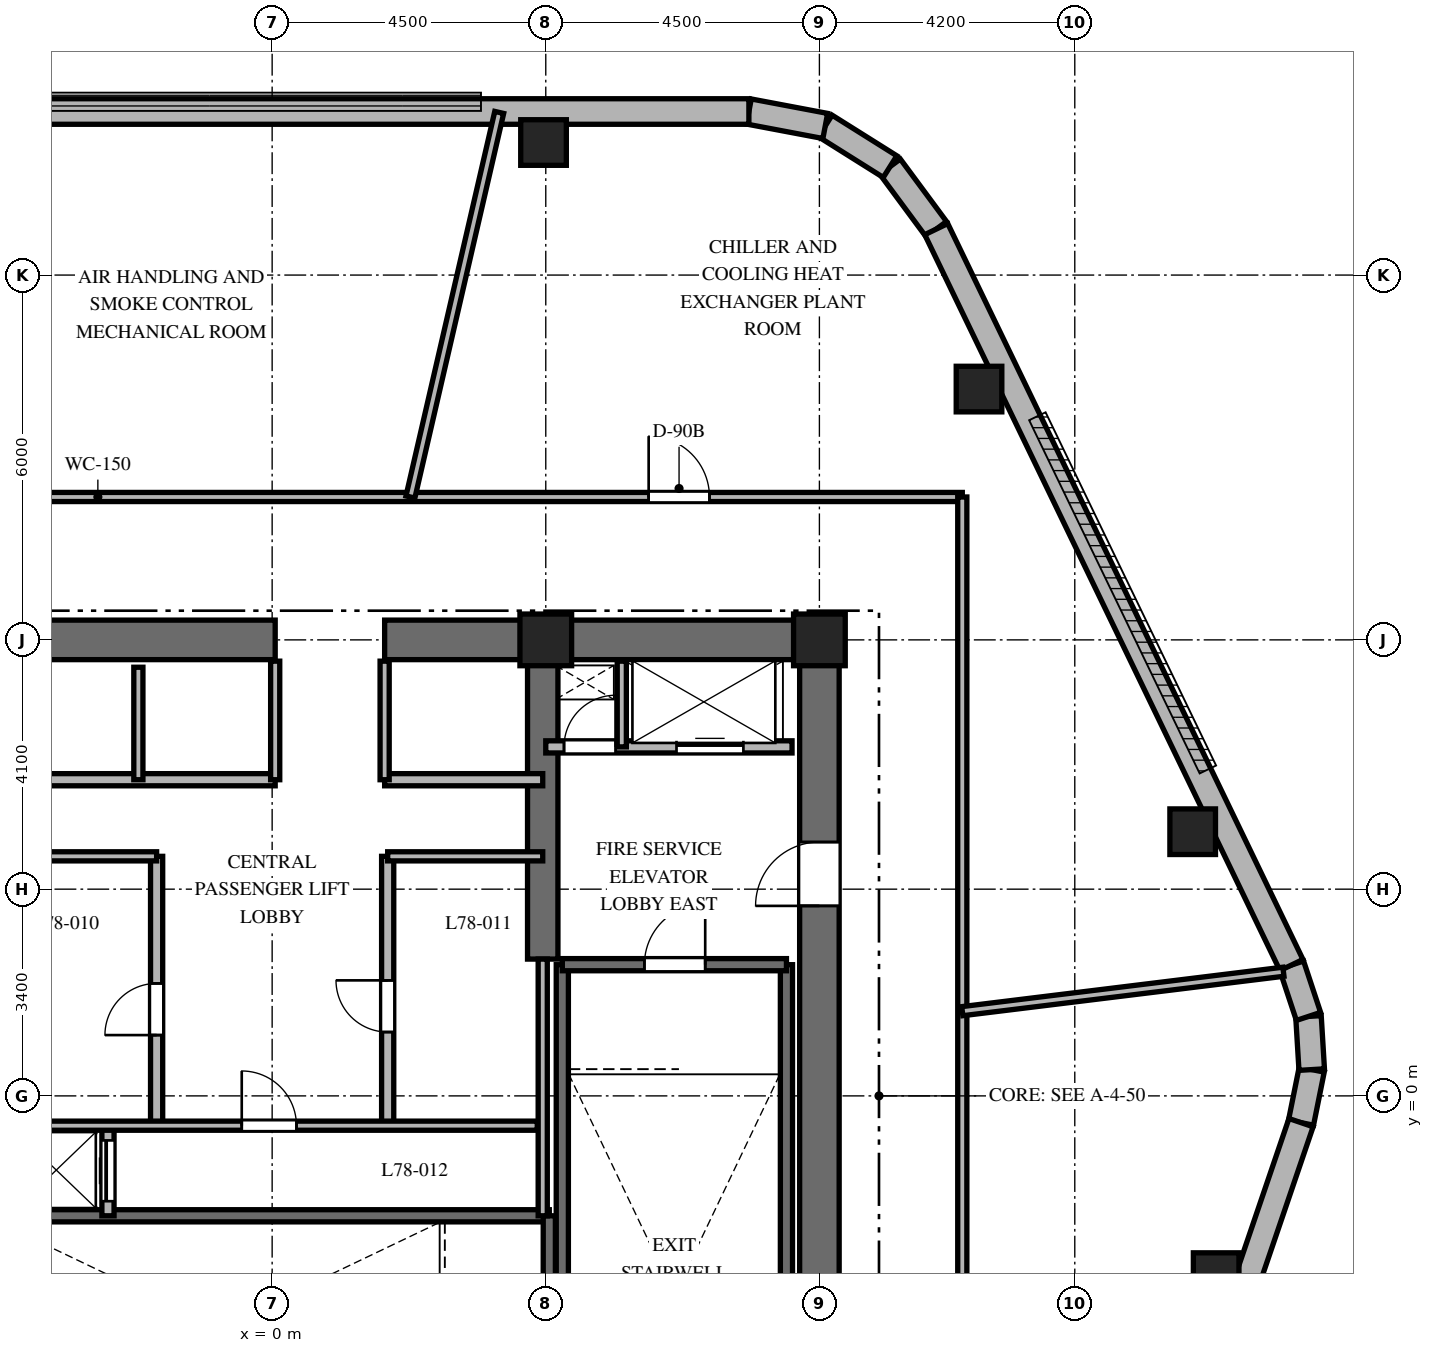
"""IFC4 building model, lengths in metres.
Left out: names, types, materials, properties, quantities, classifications, styles, units other than length and angle.
Written with IfcOpenShell. Run it as: python <this file> out.ifc"""

import sys

from ifc_helpers import new_model, si_unit, direction, frame, frame_2d, origin, origin_2d, place, context, subcontext, project, spatial, rectangle, extrude, element, fill, save


model = new_model("IFC4")
c1 = context("Model", 3, precision=1e-05, world=origin(), true_north=direction((0.0, 1.0)))
c2 = subcontext(c1, "Body", "Model", "MODEL_VIEW")
j1 = project(units=[si_unit("LENGTHUNIT", "METRE"), si_unit("PLANEANGLEUNIT", "RADIAN")], contexts=[c1])
p1 = place(None, origin())
s1 = spatial("IfcSite", under=j1, at=p1, CompositionType="ELEMENT")
p2 = place(p1, origin())
s2 = spatial("IfcBuilding", under=s1, at=p2, CompositionType="ELEMENT")
p3 = place(p2, frame((0.0, 0.0, 315.9)))
s3 = spatial("IfcBuildingStorey", under=s2, at=p3, CompositionType="ELEMENT", Elevation=315.9)
p4 = place(p3, frame((-9.325, 7.5, 0.0), z_axis=(0.0, 0.0, 1.0), x_axis=(1.0, 0.0, 0.0)))
e1 = element("IfcWall", 1, at=p4, inside=s3, PredefinedType="SHEAR", context=c2, shape_type="SweptSolid", body=[
    extrude(rectangle(XDim=9.375, YDim=0.65, at=frame_2d((4.688, 0.0))), origin(), (0.0, 0.0, 1.0), 5.5),
])
p5 = place(p3, frame((1.85, 7.5, 0.0), z_axis=(0.0, 0.0, 1.0), x_axis=(1.0, 0.0, 0.0)))
e2 = element("IfcWall", 2, at=p5, inside=s3, PredefinedType="SHEAR", context=c2, shape_type="SweptSolid", body=[
    extrude(rectangle(XDim=7.475, YDim=0.65, at=frame_2d((3.737, 0.0))), origin(), (0.0, 0.0, 1.0), 5.5),
])
p6 = place(p3, frame((9.0, -7.175, 0.0), z_axis=(0.0, 0.0, 1.0), x_axis=(0.0, 1.0, 0.0)))
e3 = element("IfcWall", 3, at=p6, inside=s3, PredefinedType="SHEAR", context=c2, shape_type="SweptSolid", body=[
    extrude(rectangle(XDim=14.35, YDim=0.65, at=frame_2d((7.175, 0.0))), origin(), (0.0, 0.0, 1.0), 5.5),
])
p7 = place(p6, frame((10.3, 0.0, 0.0)))
e4 = element("IfcOpeningElement", 4, at=p7, cuts=e3, PredefinedType="OPENING", context=c2, shape_type="SweptSolid", body=[
    extrude(rectangle(XDim=1.05, YDim=2.15, at=frame_2d((0.525, 1.075))), frame((0.0, 0.335, 0.0), z_axis=(0.0, -1.0, 0.0), x_axis=(1.0, 0.0, 0.0)), (0.0, 0.0, 1.0), 0.67),
])
p8 = place(p3, frame((4.45, 2.25, 0.0), z_axis=(0.0, 0.0, 1.0), x_axis=(0.0, 1.0, 0.0)))
e5 = element("IfcWall", 5, at=p8, inside=s3, PredefinedType="SHEAR", context=c2, shape_type="SweptSolid", body=[
    extrude(rectangle(XDim=4.925, YDim=0.5, at=frame_2d((2.462, 0.0))), origin(), (0.0, 0.0, 1.0), 5.5),
])
for number, where, z_axis, x_axis in (
    (6, (4.772, -6.985, 0.0), (0.0, 0.0, 1.0), (0.0, 1.0, 0.0)),
    (7, (8.458, -6.985, 0.0), (0.0, 0.0, 1.0), (0.0, 1.0, 0.0)),
):
    element("IfcWall", number, at=place(p3, frame(where, z_axis=z_axis, x_axis=x_axis)), inside=s3, PredefinedType="SHEAR", context=c2, shape_type="SweptSolid", body=[
        extrude(rectangle(XDim=9.143, YDim=0.2, at=frame_2d((4.572, 0.0))), origin(), (0.0, 0.0, 1.0), 5.5),
    ])
p9 = place(p3, frame((4.772, 2.158, 0.0), z_axis=(0.0, 0.0, 1.0), x_axis=(1.0, 0.0, 0.0)))
e8 = element("IfcWall", 8, at=p9, inside=s3, PredefinedType="SHEAR", context=c2, shape_type="SweptSolid", body=[
    extrude(rectangle(XDim=3.686, YDim=0.2, at=frame_2d((1.843, 0.0))), origin(), (0.0, 0.0, 1.0), 5.5),
])
p10 = place(p9, frame((1.35, 0.0, 0.0)))
e9 = element("IfcOpeningElement", 9, at=p10, cuts=e8, PredefinedType="OPENING", context=c2, shape_type="SweptSolid", body=[
    extrude(rectangle(XDim=1.0, YDim=2.15, at=frame_2d((0.5, 1.075))), frame((0.0, 0.11, 0.0), z_axis=(0.0, -1.0, 0.0), x_axis=(1.0, 0.0, 0.0)), (0.0, 0.0, 1.0), 0.22),
])
p11 = place(p3, frame((-4.608, -1.972, 0.0), z_axis=(0.0, 0.0, 1.0), x_axis=(1.0, 0.0, 0.0)))
e10 = element("IfcWall", 10, at=p11, inside=s3, PredefinedType="SHEAR", context=c2, shape_type="SweptSolid", body=[
    extrude(rectangle(XDim=9.166, YDim=0.2, at=frame_2d((4.583, 0.0))), origin(), (0.0, 0.0, 1.0), 5.5),
])
p12 = place(p3, frame((4.558, -5.658, 0.0), z_axis=(0.0, 0.0, 1.0), x_axis=(0.0, 1.0, 0.0)))
e11 = element("IfcWall", 11, at=p12, inside=s3, PredefinedType="SHEAR", context=c2, shape_type="SweptSolid", body=[
    extrude(rectangle(XDim=3.686, YDim=0.2, at=frame_2d((1.843, 0.0))), origin(), (0.0, 0.0, 1.0), 5.5),
])
for number, where, z_axis, x_axis in (
    (12, (9.0, 7.5, 0.0), (0.0, 0.0, 1.0), (1.0, 0.0, 0.0)),
    (13, (4.5, 7.5, 0.0), (0.0, 0.0, 1.0), (1.0, 0.0, 0.0)),
):
    element("IfcColumn", number, at=place(p3, frame(where, z_axis=z_axis, x_axis=x_axis)), inside=s3, PredefinedType="COLUMN", context=c2, shape_type="SweptSolid", body=[
        extrude(rectangle(XDim=0.85, YDim=0.85, at=origin_2d()), origin(), (0.0, 0.0, 1.0), 5.5),
    ])
for number, where, z_axis, x_axis in (
    (14, (15.525, -2.956, 0.0), (0.0, 0.0, 1.0), (1.0, 0.0, 0.0)),
    (15, (15.139, 4.345, 0.0), (0.0, 0.0, 1.0), (1.0, 0.0, 0.0)),
    (16, (11.625, 11.625, 0.0), (0.0, 0.0, 1.0), (1.0, 0.0, 0.0)),
    (17, (4.463, 15.68, 0.0), (0.0, 0.0, 1.0), (1.0, 0.0, 0.0)),
):
    element("IfcColumn", number, at=place(p3, frame(where, z_axis=z_axis, x_axis=x_axis)), inside=s3, PredefinedType="COLUMN", context=c2, shape_type="SweptSolid", body=[
        extrude(rectangle(XDim=0.75, YDim=0.75, at=origin_2d()), origin(), (0.0, 0.0, 1.0), 5.5),
    ])
p13 = place(p3, frame((16.921, -0.44, 0.0), z_axis=(0.0, 0.0, 1.0), x_axis=(0.197170749138, 0.980369162961, 0.0)))
e18 = element("IfcWall", 18, at=p13, inside=s3, PredefinedType="SOLIDWALL", context=c2, shape_type="SweptSolid", body=[
    extrude(rectangle(XDim=0.89, YDim=0.42, at=frame_2d((0.445, 0.0))), origin(), (0.0, 0.0, 1.0), 5.18),
])
p14 = place(p3, frame((17.096, 0.433, 0.0), z_axis=(0.0, 0.0, 1.0), x_axis=(-0.060469820114, 0.998170026025, 0.0)))
e19 = element("IfcWall", 19, at=p14, inside=s3, PredefinedType="SOLIDWALL", context=c2, shape_type="SweptSolid", body=[
    extrude(rectangle(XDim=0.876, YDim=0.42, at=frame_2d((0.438, 0.0))), origin(), (0.0, 0.0, 1.0), 5.18),
])
p15 = place(p3, frame((17.043, 1.307, 0.0), z_axis=(0.0, 0.0, 1.0), x_axis=(-0.314581701602, 0.949230400386, 0.0)))
e20 = element("IfcWall", 20, at=p15, inside=s3, PredefinedType="SOLIDWALL", context=c2, shape_type="SweptSolid", body=[
    extrude(rectangle(XDim=0.89, YDim=0.42, at=frame_2d((0.445, 0.0))), origin(), (0.0, 0.0, 1.0), 5.18),
])
p16 = place(p3, frame((10.922, 14.256, 0.0), z_axis=(0.0, 0.0, 1.0), x_axis=(-0.594423284796, 0.804152322941, 0.0)))
e21 = element("IfcWall", 21, at=p16, inside=s3, PredefinedType="SOLIDWALL", context=c2, shape_type="SweptSolid", body=[
    extrude(rectangle(XDim=1.278, YDim=0.42, at=frame_2d((0.639, 0.0))), origin(), (0.0, 0.0, 1.0), 5.18),
])
p17 = place(p3, frame((10.162, 15.284, 0.0), z_axis=(0.0, 0.0, 1.0), x_axis=(-0.846993641169, 0.53160302089, 0.0)))
e22 = element("IfcWall", 22, at=p17, inside=s3, PredefinedType="SOLIDWALL", context=c2, shape_type="SweptSolid", body=[
    extrude(rectangle(XDim=1.258, YDim=0.42, at=frame_2d((0.629, 0.0))), origin(), (0.0, 0.0, 1.0), 5.18),
])
p18 = place(p3, frame((9.096, 15.952, 0.0), z_axis=(0.0, 0.0, 1.0), x_axis=(-0.982583442004, 0.185821902637, 0.0)))
e23 = element("IfcWall", 23, at=p18, inside=s3, PredefinedType="SOLIDWALL", context=c2, shape_type="SweptSolid", body=[
    extrude(rectangle(XDim=1.278, YDim=0.42, at=frame_2d((0.639, 0.0))), origin(), (0.0, 0.0, 1.0), 5.18),
])
p19 = place(p3, frame((12.344, -13.873, 0.0), z_axis=(0.0, 0.0, 1.0), x_axis=(0.322553427155, 0.946551259378, 0.0)))
e24 = element("IfcWall", 24, at=p19, inside=s3, PredefinedType="SOLIDWALL", context=c2, shape_type="SweptSolid", body=[
    extrude(rectangle(XDim=14.191, YDim=0.42, at=frame_2d((7.096, 0.0))), origin(), (0.0, 0.0, 1.0), 5.18),
])
p20 = place(p3, frame((16.763, 2.152, 0.0), z_axis=(0.0, 0.0, 1.0), x_axis=(-0.434664735238, 0.900592342817, 0.0)))
e25 = element("IfcWall", 25, at=p20, inside=s3, PredefinedType="SOLIDWALL", context=c2, shape_type="SweptSolid", body=[
    extrude(rectangle(XDim=13.44, YDim=0.42, at=frame_2d((6.72, 0.0))), origin(), (0.0, 0.0, 1.0), 5.18),
])
p21 = place(p3, frame((7.84, 16.19, 0.0), z_axis=(0.0, 0.0, 1.0), x_axis=(-1.0, 0.0, 0.0)))
e26 = element("IfcWall", 26, at=p21, inside=s3, PredefinedType="SOLIDWALL", context=c2, shape_type="SweptSolid", body=[
    extrude(rectangle(XDim=16.946, YDim=0.42, at=frame_2d((8.473, 0.0))), origin(), (0.0, 0.0, 1.0), 5.18),
])
p22 = place(p3, frame((4.5, 5.74, 0.0), z_axis=(0.0, 0.0, 1.0), x_axis=(1.0, 0.0, 0.0)))
e27 = element("IfcWall", 27, at=p22, inside=s3, PredefinedType="PARTITIONING", context=c2, shape_type="SweptSolid", body=[
    extrude(rectangle(XDim=4.05, YDim=0.2, at=frame_2d((2.025, 0.0))), origin(), (0.0, 0.0, 1.0), 5.18),
])
p23 = place(p22, frame((0.3, 0.0, 0.0)))
e28 = element("IfcOpeningElement", 28, at=p23, cuts=e27, PredefinedType="OPENING", context=c2, shape_type="SweptSolid", body=[
    extrude(rectangle(XDim=0.85, YDim=2.03, at=frame_2d((0.425, 1.015))), frame((0.0, 0.11, 0.0), z_axis=(0.0, -1.0, 0.0), x_axis=(1.0, 0.0, 0.0)), (0.0, 0.0, 1.0), 0.22),
])
p24 = place(p22, frame((2.15, 0.0, 0.0)))
e29 = element("IfcOpeningElement", 29, at=p24, cuts=e27, PredefinedType="OPENING", context=c2, shape_type="SweptSolid", body=[
    extrude(rectangle(XDim=1.1, YDim=2.2, at=frame_2d((0.55, 1.1))), frame((0.0, 0.11, 0.0), z_axis=(0.0, -1.0, 0.0), x_axis=(1.0, 0.0, 0.0)), (0.0, 0.0, 1.0), 0.22),
])
p25 = place(p3, frame((5.75, 5.74, 0.0), z_axis=(0.0, 0.0, 1.0), x_axis=(0.0, 1.0, 0.0)))
e30 = element("IfcWall", 30, at=p25, inside=s3, PredefinedType="PARTITIONING", context=c2, shape_type="SweptSolid", body=[
    extrude(rectangle(XDim=1.41, YDim=0.15, at=frame_2d((0.705, 0.0))), origin(), (0.0, 0.0, 1.0), 5.18),
])
p26 = place(p3, frame((-2.7, -1.972, 0.0), z_axis=(0.0, 0.0, 1.0), x_axis=(0.0, 1.0, 0.0)))
e31 = element("IfcWall", 31, at=p26, inside=s3, PredefinedType="PARTITIONING", context=c2, shape_type="SweptSolid", body=[
    extrude(rectangle(XDim=1.472, YDim=0.2, at=frame_2d((0.736, 0.0))), origin(), (0.0, 0.0, 1.0), 5.18),
])
p27 = place(p26, frame((0.24, 0.0, 0.0)))
e32 = element("IfcOpeningElement", 32, at=p27, cuts=e31, PredefinedType="OPENING", context=c2, shape_type="SweptSolid", body=[
    extrude(rectangle(XDim=1.0, YDim=2.2, at=frame_2d((0.5, 1.1))), frame((0.0, 0.11, 0.0), z_axis=(0.0, -1.0, 0.0), x_axis=(1.0, 0.0, 0.0)), (0.0, 0.0, 1.0), 0.22),
])
p28 = place(p3, frame((-4.45, 5.2, 0.0), z_axis=(0.0, 0.0, 1.0), x_axis=(1.0, 0.0, 0.0)))
e33 = element("IfcWall", 33, at=p28, inside=s3, PredefinedType="PARTITIONING", context=c2, shape_type="SweptSolid", body=[
    extrude(rectangle(XDim=4.5, YDim=0.2, at=frame_2d((2.25, 0.0))), origin(), (0.0, 0.0, 1.0), 5.18),
])
p29 = place(p3, frame((1.85, 5.2, 0.0), z_axis=(0.0, 0.0, 1.0), x_axis=(1.0, 0.0, 0.0)))
e34 = element("IfcWall", 34, at=p29, inside=s3, PredefinedType="PARTITIONING", context=c2, shape_type="SweptSolid", body=[
    extrude(rectangle(XDim=2.6, YDim=0.2, at=frame_2d((1.3, 0.0))), origin(), (0.0, 0.0, 1.0), 5.18),
])
p30 = place(p3, frame((-2.2, 5.2, 0.0), z_axis=(0.0, 0.0, 1.0), x_axis=(0.0, 1.0, 0.0)))
e35 = element("IfcWall", 35, at=p30, inside=s3, PredefinedType="PARTITIONING", context=c2, shape_type="SweptSolid", body=[
    extrude(rectangle(XDim=1.85, YDim=0.15, at=frame_2d((0.925, 0.0))), origin(), (0.0, 0.0, 1.0), 5.18),
])
for number, where, z_axis, x_axis in (
    (36, (0.05, 5.2, 0.0), (0.0, 0.0, 1.0), (0.0, 1.0, 0.0)),
    (37, (1.85, 5.2, 0.0), (0.0, 0.0, 1.0), (0.0, 1.0, 0.0)),
):
    element("IfcWall", number, at=place(p3, frame(where, z_axis=z_axis, x_axis=x_axis)), inside=s3, PredefinedType="PARTITIONING", context=c2, shape_type="SweptSolid", body=[
        extrude(rectangle(XDim=1.95, YDim=0.15, at=frame_2d((0.975, 0.0))), origin(), (0.0, 0.0, 1.0), 5.18),
    ])
p31 = place(p3, frame((4.45, -1.972, 0.0), z_axis=(0.0, 0.0, 1.0), x_axis=(0.0, 1.0, 0.0)))
e38 = element("IfcWall", 38, at=p31, inside=s3, PredefinedType="PARTITIONING", context=c2, shape_type="SweptSolid", body=[
    extrude(rectangle(XDim=4.222, YDim=0.15, at=frame_2d((2.111, 0.0))), origin(), (0.0, 0.0, 1.0), 5.18),
])
p32 = place(p3, frame((-1.9, -0.5, 0.0), z_axis=(0.0, 0.0, 1.0), x_axis=(0.0, 1.0, 0.0)))
e39 = element("IfcWall", 39, at=p32, inside=s3, PredefinedType="PARTITIONING", context=c2, shape_type="SweptSolid", body=[
    extrude(rectangle(XDim=4.44, YDim=0.2, at=frame_2d((2.22, 0.0))), origin(), (0.0, 0.0, 1.0), 5.18),
])
p33 = place(p32, frame((1.5, 0.0, 0.0)))
e40 = element("IfcOpeningElement", 40, at=p33, cuts=e39, PredefinedType="OPENING", context=c2, shape_type="SweptSolid", body=[
    extrude(rectangle(XDim=0.85, YDim=2.03, at=frame_2d((0.425, 1.015))), frame((0.0, 0.11, 0.0), z_axis=(0.0, -1.0, 0.0), x_axis=(1.0, 0.0, 0.0)), (0.0, 0.0, 1.0), 0.22),
])
p34 = place(p3, frame((-4.45, 3.94, 0.0), z_axis=(0.0, 0.0, 1.0), x_axis=(1.0, 0.0, 0.0)))
e41 = element("IfcWall", 41, at=p34, inside=s3, PredefinedType="PARTITIONING", context=c2, shape_type="SweptSolid", body=[
    extrude(rectangle(XDim=2.55, YDim=0.15, at=frame_2d((1.275, 0.0))), origin(), (0.0, 0.0, 1.0), 5.18),
])
p35 = place(p3, frame((1.9, -0.5, 0.0), z_axis=(0.0, 0.0, 1.0), x_axis=(0.0, 1.0, 0.0)))
e42 = element("IfcWall", 42, at=p35, inside=s3, PredefinedType="PARTITIONING", context=c2, shape_type="SweptSolid", body=[
    extrude(rectangle(XDim=4.44, YDim=0.2, at=frame_2d((2.22, 0.0))), origin(), (0.0, 0.0, 1.0), 5.18),
])
p36 = place(p35, frame((1.55, 0.0, 0.0)))
e43 = element("IfcOpeningElement", 43, at=p36, cuts=e42, PredefinedType="OPENING", context=c2, shape_type="SweptSolid", body=[
    extrude(rectangle(XDim=0.85, YDim=2.03, at=frame_2d((0.425, 1.015))), frame((0.0, 0.11, 0.0), z_axis=(0.0, -1.0, 0.0), x_axis=(1.0, 0.0, 0.0)), (0.0, 0.0, 1.0), 0.22),
])
p37 = place(p3, frame((1.9, 3.94, 0.0), z_axis=(0.0, 0.0, 1.0), x_axis=(1.0, 0.0, 0.0)))
e44 = element("IfcWall", 44, at=p37, inside=s3, PredefinedType="PARTITIONING", context=c2, shape_type="SweptSolid", body=[
    extrude(rectangle(XDim=2.55, YDim=0.15, at=frame_2d((1.275, 0.0))), origin(), (0.0, 0.0, 1.0), 5.18),
])
p38 = place(p3, frame((-4.36, -0.49, 0.0), z_axis=(0.0, 0.0, 1.0), x_axis=(1.0, 0.0, 0.0)))
e45 = element("IfcWall", 45, at=p38, inside=s3, PredefinedType="PARTITIONING", context=c2, shape_type="SweptSolid", body=[
    extrude(rectangle(XDim=8.72, YDim=0.15, at=frame_2d((4.36, 0.0))), origin(), (0.0, 0.0, 1.0), 5.18),
])
p39 = place(p38, frame((3.86, 0.0, 0.0)))
e46 = element("IfcOpeningElement", 46, at=p39, cuts=e45, PredefinedType="OPENING", context=c2, shape_type="SweptSolid", body=[
    extrude(rectangle(XDim=0.9, YDim=2.03, at=frame_2d((0.45, 1.015))), frame((0.0, 0.085, 0.0), z_axis=(0.0, -1.0, 0.0), x_axis=(1.0, 0.0, 0.0)), (0.0, 0.0, 1.0), 0.17),
])
p40 = place(p3, frame((-11.35, 9.85, 0.0), z_axis=(0.0, 0.0, 1.0), x_axis=(1.0, 0.0, 0.0)))
e47 = element("IfcWall", 47, at=p40, inside=s3, PredefinedType="PARTITIONING", context=c2, shape_type="SweptSolid", body=[
    extrude(rectangle(XDim=22.7, YDim=0.15, at=frame_2d((11.35, 0.0))), origin(), (0.0, 0.0, 1.0), 4.67),
])
p41 = place(p40, frame((17.542, 0.0, 0.0)))
e48 = element("IfcOpeningElement", 48, at=p41, cuts=e47, PredefinedType="OPENING", context=c2, shape_type="SweptSolid", body=[
    extrude(rectangle(XDim=1.0, YDim=2.15, at=frame_2d((0.5, 1.075))), frame((0.0, 0.085, 0.0), z_axis=(0.0, -1.0, 0.0), x_axis=(1.0, 0.0, 0.0)), (0.0, 0.0, 1.0), 0.17),
])
p42 = place(p3, frame((11.35, 9.85, 0.0), z_axis=(0.0, 0.0, 1.0), x_axis=(0.0, -1.0, 0.0)))
e49 = element("IfcWall", 49, at=p42, inside=s3, PredefinedType="PARTITIONING", context=c2, shape_type="SweptSolid", body=[
    extrude(rectangle(XDim=19.7, YDim=0.15, at=frame_2d((9.85, 0.0))), origin(), (0.0, 0.0, 1.0), 4.67),
])
p43 = place(p42, frame((13.457, 0.0, 0.0)))
e50 = element("IfcOpeningElement", 50, at=p43, cuts=e49, PredefinedType="OPENING", context=c2, shape_type="SweptSolid", body=[
    extrude(rectangle(XDim=1.0, YDim=2.15, at=frame_2d((0.5, 1.075))), frame((0.0, 0.085, 0.0), z_axis=(0.0, -1.0, 0.0), x_axis=(1.0, 0.0, 0.0)), (0.0, 0.0, 1.0), 0.17),
])
p44 = place(p3, frame((11.35, 1.394, 0.0), z_axis=(0.0, 0.0, 1.0), x_axis=(0.992546571341, 0.121865925179, 0.0)))
e51 = element("IfcWall", 51, at=p44, inside=s3, PredefinedType="PARTITIONING", context=c2, shape_type="SweptSolid", body=[
    extrude(rectangle(XDim=5.321, YDim=0.15, at=frame_2d((2.66, 0.0))), origin(), (0.0, 0.0, 1.0), 4.52),
])
p45 = place(p3, frame((2.274, 9.85, 0.0), z_axis=(0.0, 0.0, 1.0), x_axis=(0.224947404091, 0.974370907505, 0.0)))
e52 = element("IfcWall", 52, at=p45, inside=s3, PredefinedType="PARTITIONING", context=c2, shape_type="SweptSolid", body=[
    extrude(rectangle(XDim=6.491, YDim=0.15, at=frame_2d((3.246, 0.0))), origin(), (0.0, 0.0, 1.0), 4.52),
])
p46 = place(p10, origin())
e53 = element("IfcDoor", 53, at=p46, inside=s3, OperationType="SINGLE_SWING_RIGHT", PredefinedType="DOOR", context=c2, shape_type="SweptSolid", body=[
    extrude(rectangle(XDim=1.0, YDim=2.15, at=frame_2d((0.5, 1.075))), frame((0.0, 0.025, 0.0), z_axis=(0.0, -1.0, 0.0), x_axis=(1.0, 0.0, 0.0)), (0.0, 0.0, 1.0), 0.05),
])
fill(e9, e53)
p47 = place(p7, origin())
e54 = element("IfcDoor", 54, at=p47, inside=s3, OperationType="SINGLE_SWING_LEFT", PredefinedType="DOOR", context=c2, shape_type="SweptSolid", body=[
    extrude(rectangle(XDim=1.05, YDim=2.15, at=frame_2d((0.525, 1.075))), frame((0.0, 0.025, 0.0), z_axis=(0.0, -1.0, 0.0), x_axis=(1.0, 0.0, 0.0)), (0.0, 0.0, 1.0), 0.05),
])
fill(e4, e54)
p48 = place(p23, origin())
e55 = element("IfcDoor", 55, at=p48, inside=s3, OperationType="SINGLE_SWING_RIGHT", PredefinedType="DOOR", context=c2, shape_type="SweptSolid", body=[
    extrude(rectangle(XDim=0.85, YDim=2.03, at=frame_2d((0.425, 1.015))), frame((0.0, 0.025, 0.0), z_axis=(0.0, -1.0, 0.0), x_axis=(1.0, 0.0, 0.0)), (0.0, 0.0, 1.0), 0.05),
])
fill(e28, e55)
p49 = place(p24, origin())
e56 = element("IfcDoor", 56, at=p49, inside=s3, OperationType="SLIDING_TO_RIGHT", PredefinedType="DOOR", context=c2, shape_type="SweptSolid", body=[
    extrude(rectangle(XDim=1.1, YDim=2.2, at=frame_2d((0.55, 1.1))), frame((0.0, 0.025, 0.0), z_axis=(0.0, -1.0, 0.0), x_axis=(1.0, 0.0, 0.0)), (0.0, 0.0, 1.0), 0.05),
])
fill(e29, e56)
p50 = place(p27, origin())
e57 = element("IfcDoor", 57, at=p50, inside=s3, OperationType="SLIDING_TO_LEFT", PredefinedType="DOOR", context=c2, shape_type="SweptSolid", body=[
    extrude(rectangle(XDim=1.0, YDim=2.2, at=frame_2d((0.5, 1.1))), frame((0.0, 0.025, 0.0), z_axis=(0.0, -1.0, 0.0), x_axis=(1.0, 0.0, 0.0)), (0.0, 0.0, 1.0), 0.05),
])
fill(e32, e57)
p51 = place(p33, origin())
e58 = element("IfcDoor", 58, at=p51, inside=s3, OperationType="SINGLE_SWING_LEFT", PredefinedType="DOOR", context=c2, shape_type="SweptSolid", body=[
    extrude(rectangle(XDim=0.85, YDim=2.03, at=frame_2d((0.425, 1.015))), frame((0.0, 0.025, 0.0), z_axis=(0.0, -1.0, 0.0), x_axis=(1.0, 0.0, 0.0)), (0.0, 0.0, 1.0), 0.05),
])
fill(e40, e58)
p52 = place(p36, origin())
e59 = element("IfcDoor", 59, at=p52, inside=s3, OperationType="SINGLE_SWING_RIGHT", PredefinedType="DOOR", context=c2, shape_type="SweptSolid", body=[
    extrude(rectangle(XDim=0.85, YDim=2.03, at=frame_2d((0.425, 1.015))), frame((0.0, 0.025, 0.0), z_axis=(0.0, -1.0, 0.0), x_axis=(1.0, 0.0, 0.0)), (0.0, 0.0, 1.0), 0.05),
])
fill(e43, e59)
p53 = place(p39, origin())
e60 = element("IfcDoor", 60, at=p53, inside=s3, OperationType="SINGLE_SWING_LEFT", PredefinedType="DOOR", context=c2, shape_type="SweptSolid", body=[
    extrude(rectangle(XDim=0.9, YDim=2.03, at=frame_2d((0.45, 1.015))), frame((0.0, 0.025, 0.0), z_axis=(0.0, -1.0, 0.0), x_axis=(1.0, 0.0, 0.0)), (0.0, 0.0, 1.0), 0.05),
])
fill(e46, e60)
p54 = place(p41, origin())
e61 = element("IfcDoor", 61, at=p54, inside=s3, OperationType="SINGLE_SWING_LEFT", PredefinedType="DOOR", context=c2, shape_type="SweptSolid", body=[
    extrude(rectangle(XDim=1.0, YDim=2.15, at=frame_2d((0.5, 1.075))), frame((0.0, 0.025, 0.0), z_axis=(0.0, -1.0, 0.0), x_axis=(1.0, 0.0, 0.0)), (0.0, 0.0, 1.0), 0.05),
])
fill(e48, e61)
save(model, sys.argv[1])
